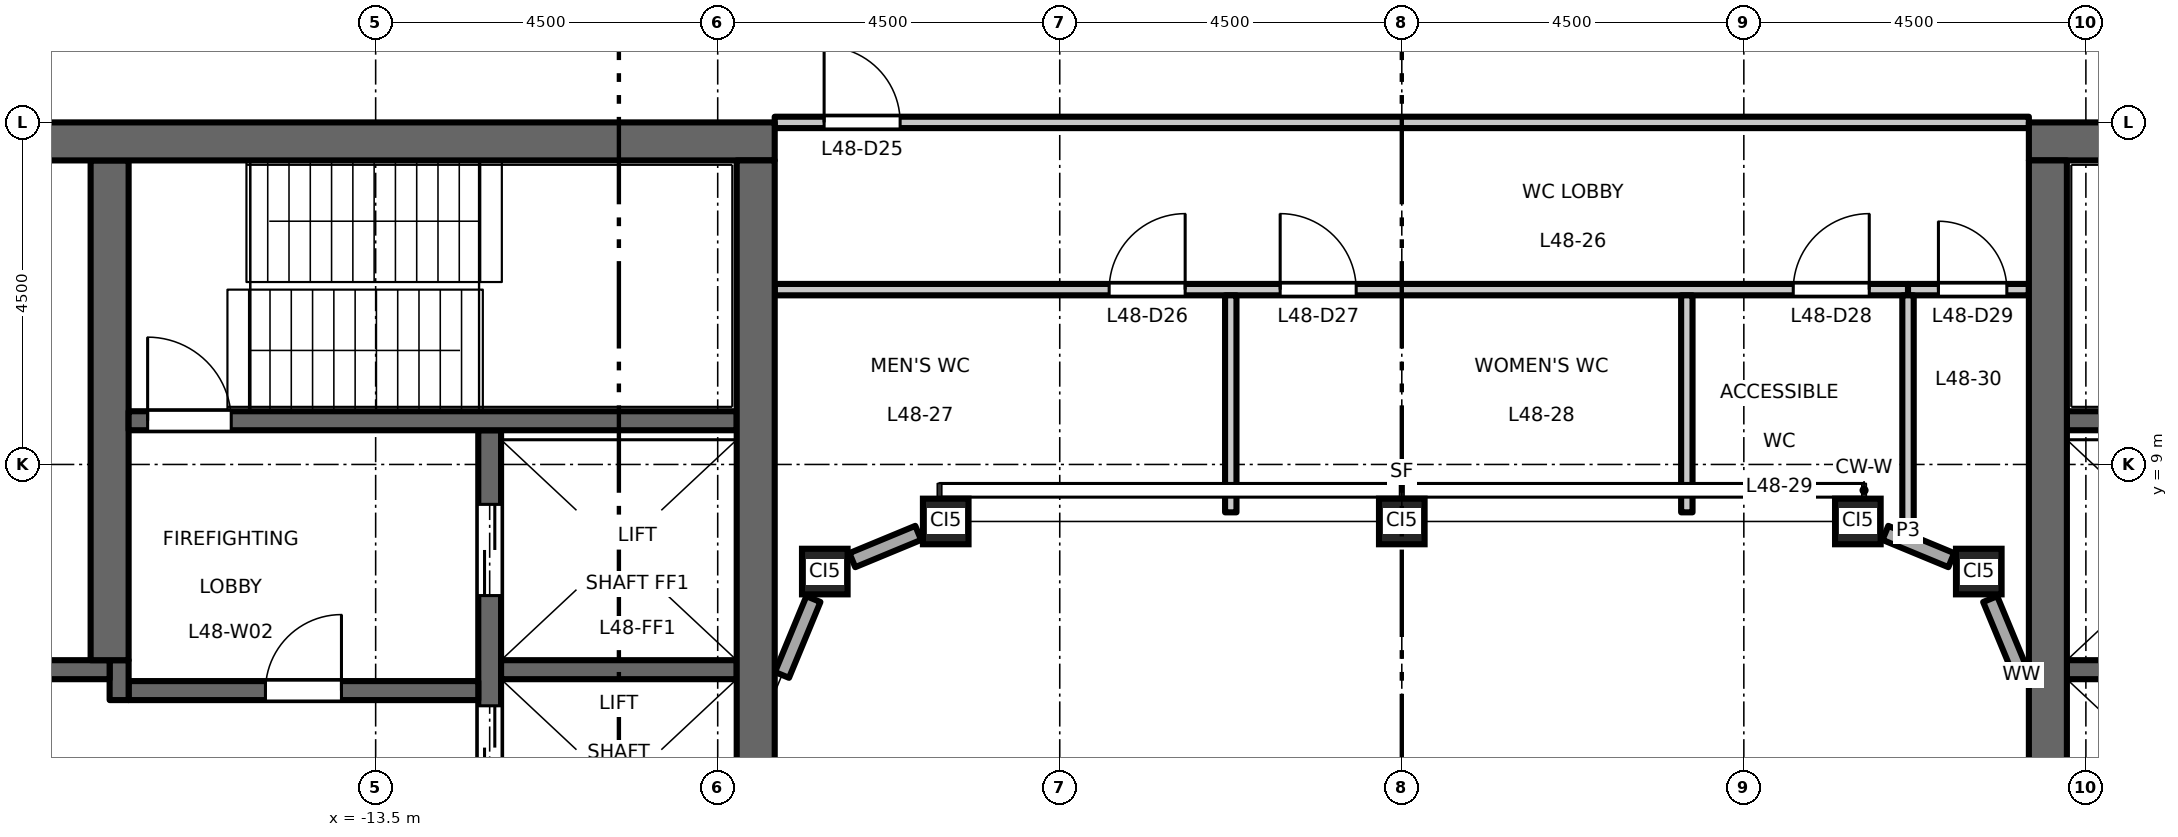
"""IFC4 building model, lengths in metres.
Left out: names, types, materials, properties, quantities, classifications, styles, units other than length and angle.
Written with IfcOpenShell. Run it as: python <this file> out.ifc"""

import sys

from ifc_helpers import new_model, si_unit, direction, frame, frame_2d, origin, origin_2d, place, context, subcontext, project, spatial, rectangle, hollow_rectangle, extrude, element, fill, save


model = new_model("IFC4")
c1 = context("Model", 3, precision=1e-05, world=origin(), true_north=direction((0.0, 1.0)))
c2 = subcontext(c1, "Body", "Model", "MODEL_VIEW")
j1 = project(units=[si_unit("LENGTHUNIT", "METRE"), si_unit("PLANEANGLEUNIT", "RADIAN")], contexts=[c1])
p1 = place(None, origin())
s1 = spatial("IfcSite", under=j1, at=p1, CompositionType="ELEMENT")
p2 = place(p1, origin())
s2 = spatial("IfcBuilding", under=s1, at=p2, CompositionType="ELEMENT")
p3 = place(p2, frame((0.0, 0.0, 224.2)))
s3 = spatial("IfcBuildingStorey", under=s2, at=p3, CompositionType="ELEMENT", Elevation=224.2)
for number, where, z_axis, x_axis in (
    (1, (-7.591, 7.591, 0.0), (0.0, 0.0, 1.0), (1.0, 0.0, 0.0)),
    (2, (-6.0, 8.25, 0.0), (0.0, 0.0, 1.0), (1.0, 0.0, 0.0)),
    (3, (0.0, 8.25, 0.0), (0.0, 0.0, 1.0), (1.0, 0.0, 0.0)),
    (4, (6.0, 8.25, 0.0), (0.0, 0.0, 1.0), (1.0, 0.0, 0.0)),
    (5, (7.591, 7.591, 0.0), (0.0, 0.0, 1.0), (1.0, 0.0, 0.0)),
):
    element("IfcColumn", number, at=place(p3, frame(where, z_axis=z_axis, x_axis=x_axis)), inside=s3, PredefinedType="COLUMN", context=c2, shape_type="SweptSolid", body=[
        extrude(hollow_rectangle(XDim=0.6, YDim=0.6, WallThickness=0.032, at=origin_2d()), origin(), (0.0, 0.0, 1.0), 4.5),
    ])
p4 = place(p3, frame((-12.0, -9.45, 0.0), z_axis=(0.0, 0.0, 1.0), x_axis=(0.0, 1.0, 0.0)))
e6 = element("IfcWall", 6, at=p4, inside=s3, PredefinedType="SHEAR", context=c2, shape_type="SweptSolid", body=[
    extrude(rectangle(XDim=18.9, YDim=0.3, at=frame_2d((9.45, 0.0))), origin(), (0.0, 0.0, 1.0), 4.35),
])
p5 = place(p4, frame((4.725, 0.0, 0.0)))
e7 = element("IfcOpeningElement", 7, at=p5, cuts=e6, PredefinedType="OPENING", context=c2, shape_type="SweptSolid", body=[
    extrude(rectangle(XDim=1.1, YDim=2.1, at=frame_2d((0.55, 1.05))), frame((0.0, 0.16, 0.0), z_axis=(0.0, -1.0, 0.0), x_axis=(1.0, 0.0, 0.0)), (0.0, 0.0, 1.0), 0.32),
])
p6 = place(p4, frame((7.875, 0.0, 0.0)))
e8 = element("IfcOpeningElement", 8, at=p6, cuts=e6, PredefinedType="OPENING", context=c2, shape_type="SweptSolid", body=[
    extrude(rectangle(XDim=1.1, YDim=2.1, at=frame_2d((0.55, 1.05))), frame((0.0, 0.16, 0.0), z_axis=(0.0, -1.0, 0.0), x_axis=(1.0, 0.0, 0.0)), (0.0, 0.0, 1.0), 0.32),
])
p7 = place(p4, frame((11.025, 0.0, 0.0)))
e9 = element("IfcOpeningElement", 9, at=p7, cuts=e6, PredefinedType="OPENING", context=c2, shape_type="SweptSolid", body=[
    extrude(rectangle(XDim=1.1, YDim=2.1, at=frame_2d((0.55, 1.05))), frame((0.0, 0.16, 0.0), z_axis=(0.0, -1.0, 0.0), x_axis=(1.0, 0.0, 0.0)), (0.0, 0.0, 1.0), 0.32),
])
p8 = place(p4, frame((14.175, 0.0, 0.0)))
e10 = element("IfcOpeningElement", 10, at=p8, cuts=e6, PredefinedType="OPENING", context=c2, shape_type="SweptSolid", body=[
    extrude(rectangle(XDim=1.1, YDim=2.1, at=frame_2d((0.55, 1.05))), frame((0.0, 0.16, 0.0), z_axis=(0.0, -1.0, 0.0), x_axis=(1.0, 0.0, 0.0)), (0.0, 0.0, 1.0), 0.32),
])
p9 = place(p4, frame((16.725, 0.0, 0.0)))
e11 = element("IfcOpeningElement", 11, at=p9, cuts=e6, PredefinedType="OPENING", context=c2, shape_type="SweptSolid", body=[
    extrude(rectangle(XDim=1.2, YDim=2.1, at=frame_2d((0.6, 1.05))), frame((0.0, 0.16, 0.0), z_axis=(0.0, -1.0, 0.0), x_axis=(1.0, 0.0, 0.0)), (0.0, 0.0, 1.0), 0.32),
])
p10 = place(p4, frame((0.975, 0.0, 0.0)))
e12 = element("IfcOpeningElement", 12, at=p10, cuts=e6, PredefinedType="OPENING", context=c2, shape_type="SweptSolid", body=[
    extrude(rectangle(XDim=1.2, YDim=2.1, at=frame_2d((0.6, 1.05))), frame((0.0, 0.16, 0.0), z_axis=(0.0, -1.0, 0.0), x_axis=(1.0, 0.0, 0.0)), (0.0, 0.0, 1.0), 0.32),
])
p11 = place(p3, frame((-12.15, 6.025, 0.0), z_axis=(0.0, 0.0, 1.0), x_axis=(-1.0, 0.0, 0.0)))
e13 = element("IfcWall", 13, at=p11, inside=s3, PredefinedType="SHEAR", context=c2, shape_type="SweptSolid", body=[
    extrude(rectangle(XDim=4.6, YDim=0.25, at=frame_2d((2.3, 0.0))), origin(), (0.0, 0.0, 1.0), 4.35),
])
p12 = place(p11, frame((1.8, 0.0, 0.0)))
e14 = element("IfcOpeningElement", 14, at=p12, cuts=e13, PredefinedType="OPENING", context=c2, shape_type="SweptSolid", body=[
    extrude(rectangle(XDim=1.0, YDim=2.1, at=frame_2d((0.5, 1.05))), frame((0.0, 0.135, 0.0), z_axis=(0.0, -1.0, 0.0), x_axis=(1.0, 0.0, 0.0)), (0.0, 0.0, 1.0), 0.27),
])
p13 = place(p3, frame((-16.875, 5.9, 0.0), z_axis=(0.0, 0.0, 1.0), x_axis=(0.0, 1.0, 0.0)))
e15 = element("IfcWall", 15, at=p13, inside=s3, PredefinedType="SHEAR", context=c2, shape_type="SweptSolid", body=[
    extrude(rectangle(XDim=0.525, YDim=0.25, at=frame_2d((0.263, 0.0))), origin(), (0.0, 0.0, 1.0), 4.35),
])
p14 = place(p3, frame((-17.0, 6.3, 0.0), z_axis=(0.0, 0.0, 1.0), x_axis=(-1.0, 0.0, 0.0)))
e16 = element("IfcWall", 16, at=p14, inside=s3, PredefinedType="SHEAR", context=c2, shape_type="SweptSolid", body=[
    extrude(rectangle(XDim=4.25, YDim=0.25, at=frame_2d((2.125, 0.0))), origin(), (0.0, 0.0, 1.0), 4.35),
])
p15 = place(p3, frame((-17.0, 6.425, 0.0), z_axis=(0.0, 0.0, 1.0), x_axis=(0.0, 1.0, 0.0)))
e17 = element("IfcWall", 17, at=p15, inside=s3, PredefinedType="SHEAR", context=c2, shape_type="SweptSolid", body=[
    extrude(rectangle(XDim=6.575, YDim=0.5, at=frame_2d((3.288, 0.0))), origin(), (0.0, 0.0, 1.0), 4.35),
])
p16 = place(p3, frame((-8.75, 6.3, 0.0), z_axis=(0.0, 0.0, 1.0), x_axis=(-1.0, 0.0, 0.0)))
e18 = element("IfcWall", 18, at=p16, inside=s3, PredefinedType="SHEAR", context=c2, shape_type="SweptSolid", body=[
    extrude(rectangle(XDim=3.1, YDim=0.25, at=frame_2d((1.55, 0.0))), origin(), (0.0, 0.0, 1.0), 4.35),
])
p17 = place(p3, frame((-8.75, 9.575, 0.0), z_axis=(0.0, 0.0, 1.0), x_axis=(-1.0, 0.0, 0.0)))
e19 = element("IfcWall", 19, at=p17, inside=s3, PredefinedType="SHEAR", context=c2, shape_type="SweptSolid", body=[
    extrude(rectangle(XDim=8.0, YDim=0.25, at=frame_2d((4.0, 0.0))), origin(), (0.0, 0.0, 1.0), 4.35),
])
p18 = place(p17, frame((6.65, 0.0, 0.0)))
e20 = element("IfcOpeningElement", 20, at=p18, cuts=e19, PredefinedType="OPENING", context=c2, shape_type="SweptSolid", body=[
    extrude(rectangle(XDim=1.1, YDim=2.1, at=frame_2d((0.55, 1.05))), frame((0.0, 0.135, 0.0), z_axis=(0.0, -1.0, 0.0), x_axis=(1.0, 0.0, 0.0)), (0.0, 0.0, 1.0), 0.27),
])
p19 = place(p3, frame((-8.25, 13.25, 0.0), z_axis=(0.0, 0.0, 1.0), x_axis=(-1.0, 0.0, 0.0)))
e21 = element("IfcWall", 21, at=p19, inside=s3, PredefinedType="SHEAR", context=c2, shape_type="SweptSolid", body=[
    extrude(rectangle(XDim=13.5, YDim=0.5, at=frame_2d((6.75, 0.0))), origin(), (0.0, 0.0, 1.0), 4.35),
])
p20 = place(p3, frame((-8.5, -13.0, 0.0), z_axis=(0.0, 0.0, 1.0), x_axis=(0.0, 1.0, 0.0)))
e22 = element("IfcWall", 22, at=p20, inside=s3, PredefinedType="SHEAR", context=c2, shape_type="SweptSolid", body=[
    extrude(rectangle(XDim=26.0, YDim=0.5, at=frame_2d((13.0, 0.0))), origin(), (0.0, 0.0, 1.0), 4.35),
])
p21 = place(p3, frame((8.75, 6.3, 0.0), z_axis=(0.0, 0.0, 1.0), x_axis=(1.0, 0.0, 0.0)))
e23 = element("IfcWall", 23, at=p21, inside=s3, PredefinedType="SHEAR", context=c2, shape_type="SweptSolid", body=[
    extrude(rectangle(XDim=3.1, YDim=0.25, at=frame_2d((1.55, 0.0))), origin(), (0.0, 0.0, 1.0), 4.35),
])
p22 = place(p3, frame((8.75, 9.575, 0.0), z_axis=(0.0, 0.0, 1.0), x_axis=(1.0, 0.0, 0.0)))
e24 = element("IfcWall", 24, at=p22, inside=s3, PredefinedType="SHEAR", context=c2, shape_type="SweptSolid", body=[
    extrude(rectangle(XDim=8.0, YDim=0.25, at=frame_2d((4.0, 0.0))), origin(), (0.0, 0.0, 1.0), 4.35),
])
p23 = place(p22, frame((6.65, 0.0, 0.0)))
e25 = element("IfcOpeningElement", 25, at=p23, cuts=e24, PredefinedType="OPENING", context=c2, shape_type="SweptSolid", body=[
    extrude(rectangle(XDim=1.1, YDim=2.1, at=frame_2d((0.55, 1.05))), frame((0.0, 0.135, 0.0), z_axis=(0.0, -1.0, 0.0), x_axis=(1.0, 0.0, 0.0)), (0.0, 0.0, 1.0), 0.27),
])
p24 = place(p3, frame((8.25, 13.25, 0.0), z_axis=(0.0, 0.0, 1.0), x_axis=(1.0, 0.0, 0.0)))
e26 = element("IfcWall", 26, at=p24, inside=s3, PredefinedType="SHEAR", context=c2, shape_type="SweptSolid", body=[
    extrude(rectangle(XDim=13.5, YDim=0.5, at=frame_2d((6.75, 0.0))), origin(), (0.0, 0.0, 1.0), 4.35),
])
p25 = place(p3, frame((8.5, -13.0, 0.0), z_axis=(0.0, 0.0, 1.0), x_axis=(0.0, 1.0, 0.0)))
e27 = element("IfcWall", 27, at=p25, inside=s3, PredefinedType="SHEAR", context=c2, shape_type="SweptSolid", body=[
    extrude(rectangle(XDim=26.0, YDim=0.5, at=frame_2d((13.0, 0.0))), origin(), (0.0, 0.0, 1.0), 4.35),
])
p26 = place(p3, frame((8.154, 6.231, 0.0), z_axis=(0.0, 0.0, 1.0), x_axis=(-0.382704496366, 0.923870807235, 0.0)))
e28 = element("IfcWall", 28, at=p26, inside=s3, PredefinedType="STANDARD", context=c2, shape_type="SweptSolid", body=[
    extrude(rectangle(XDim=1.08, YDim=0.2, at=frame_2d((0.54, 0.0))), origin(), (0.0, 0.0, 1.0), 3.918),
])
for number, where, z_axis, x_axis in (
    (29, (7.229, 7.741, 0.0), (0.0, 0.0, 1.0), (-0.924, 0.383, 0.0)),
    (30, (-6.362, 8.1, 0.0), (0.0, 0.0, 1.0), (-0.924, -0.383, 0.0)),
):
    element("IfcWall", number, at=place(p3, frame(where, z_axis=z_axis, x_axis=x_axis)), inside=s3, PredefinedType="STANDARD", context=c2, shape_type="SweptSolid", body=[
        extrude(rectangle(XDim=0.938, YDim=0.2, at=frame_2d((0.469, 0.0))), origin(), (0.0, 0.0, 1.0), 3.918),
    ])
p27 = place(p3, frame((-7.741, 7.229, 0.0), z_axis=(0.0, 0.0, 1.0), x_axis=(-0.382704496366, -0.923870807235, 0.0)))
e31 = element("IfcWall", 31, at=p27, inside=s3, PredefinedType="STANDARD", context=c2, shape_type="SweptSolid", body=[
    extrude(rectangle(XDim=1.08, YDim=0.2, at=frame_2d((0.54, 0.0))), origin(), (0.0, 0.0, 1.0), 3.918),
])
p28 = place(p3, frame((-8.25, 11.3, 0.0), z_axis=(0.0, 0.0, 1.0), x_axis=(1.0, 0.0, 0.0)))
e32 = element("IfcWall", 32, at=p28, inside=s3, PredefinedType="PARTITIONING", context=c2, shape_type="SweptSolid", body=[
    extrude(rectangle(XDim=14.91, YDim=0.15, at=frame_2d((7.455, 0.0))), origin(), (0.0, 0.0, 1.0), 4.35),
])
p29 = place(p28, frame((4.4, 0.0, 0.0)))
e33 = element("IfcOpeningElement", 33, at=p29, cuts=e32, PredefinedType="OPENING", context=c2, shape_type="SweptSolid", body=[
    extrude(rectangle(XDim=1.0, YDim=2.1, at=frame_2d((0.5, 1.05))), frame((0.0, 0.085, 0.0), z_axis=(0.0, -1.0, 0.0), x_axis=(1.0, 0.0, 0.0)), (0.0, 0.0, 1.0), 0.17),
])
p30 = place(p28, frame((6.65, 0.0, 0.0)))
e34 = element("IfcOpeningElement", 34, at=p30, cuts=e32, PredefinedType="OPENING", context=c2, shape_type="SweptSolid", body=[
    extrude(rectangle(XDim=1.0, YDim=2.1, at=frame_2d((0.5, 1.05))), frame((0.0, 0.085, 0.0), z_axis=(0.0, -1.0, 0.0), x_axis=(1.0, 0.0, 0.0)), (0.0, 0.0, 1.0), 0.17),
])
p31 = place(p28, frame((13.4, 0.0, 0.0)))
e35 = element("IfcOpeningElement", 35, at=p31, cuts=e32, PredefinedType="OPENING", context=c2, shape_type="SweptSolid", body=[
    extrude(rectangle(XDim=1.0, YDim=2.1, at=frame_2d((0.5, 1.05))), frame((0.0, 0.085, 0.0), z_axis=(0.0, -1.0, 0.0), x_axis=(1.0, 0.0, 0.0)), (0.0, 0.0, 1.0), 0.17),
])
p32 = place(p3, frame((6.66, 11.3, 0.0), z_axis=(0.0, 0.0, 1.0), x_axis=(1.0, 0.0, 0.0)))
e36 = element("IfcWall", 36, at=p32, inside=s3, PredefinedType="PARTITIONING", context=c2, shape_type="SweptSolid", body=[
    extrude(rectangle(XDim=1.59, YDim=0.15, at=frame_2d((0.795, 0.0))), origin(), (0.0, 0.0, 1.0), 4.35),
])
p33 = place(p32, frame((0.4, 0.0, 0.0)))
e37 = element("IfcOpeningElement", 37, at=p33, cuts=e36, PredefinedType="OPENING", context=c2, shape_type="SweptSolid", body=[
    extrude(rectangle(XDim=0.9, YDim=2.1, at=frame_2d((0.45, 1.05))), frame((0.0, 0.085, 0.0), z_axis=(0.0, -1.0, 0.0), x_axis=(1.0, 0.0, 0.0)), (0.0, 0.0, 1.0), 0.17),
])
p34 = place(p3, frame((-8.25, 13.5, 0.0), z_axis=(0.0, 0.0, 1.0), x_axis=(1.0, 0.0, 0.0)))
e38 = element("IfcWall", 38, at=p34, inside=s3, PredefinedType="PARTITIONING", context=c2, shape_type="SweptSolid", body=[
    extrude(rectangle(XDim=16.5, YDim=0.15, at=frame_2d((8.25, 0.0))), origin(), (0.0, 0.0, 1.0), 4.35),
])
p35 = place(p34, frame((0.65, 0.0, 0.0)))
e39 = element("IfcOpeningElement", 39, at=p35, cuts=e38, PredefinedType="OPENING", context=c2, shape_type="SweptSolid", body=[
    extrude(rectangle(XDim=1.0, YDim=2.1, at=frame_2d((0.5, 1.05))), frame((0.0, 0.085, 0.0), z_axis=(0.0, -1.0, 0.0), x_axis=(1.0, 0.0, 0.0)), (0.0, 0.0, 1.0), 0.17),
])
for number, where, z_axis, x_axis in (
    (40, (-2.25, 8.37, 0.0), (0.0, 0.0, 1.0), (0.0, 1.0, 0.0)),
    (41, (3.75, 8.37, 0.0), (0.0, 0.0, 1.0), (0.0, 1.0, 0.0)),
):
    element("IfcWall", number, at=place(p3, frame(where, z_axis=z_axis, x_axis=x_axis)), inside=s3, PredefinedType="PARTITIONING", context=c2, shape_type="SweptSolid", body=[
        extrude(rectangle(XDim=2.855, YDim=0.15, at=frame_2d((1.427, 0.0))), origin(), (0.0, 0.0, 1.0), 4.35),
    ])
p36 = place(p3, frame((6.66, 8.127, 0.0), z_axis=(0.0, 0.0, 1.0), x_axis=(0.0, 1.0, 0.0)))
e42 = element("IfcWall", 42, at=p36, inside=s3, PredefinedType="PARTITIONING", context=c2, shape_type="SweptSolid", body=[
    extrude(rectangle(XDim=3.098, YDim=0.15, at=frame_2d((1.549, 0.0))), origin(), (0.0, 0.0, 1.0), 4.35),
])
p37 = place(p12, origin())
e43 = element("IfcDoor", 43, at=p37, inside=s3, OperationType="SINGLE_SWING_LEFT", PredefinedType="DOOR", context=c2, shape_type="SweptSolid", body=[
    extrude(rectangle(XDim=1.0, YDim=2.1, at=frame_2d((0.5, 1.05))), frame((0.0, 0.025, 0.0), z_axis=(0.0, -1.0, 0.0), x_axis=(1.0, 0.0, 0.0)), (0.0, 0.0, 1.0), 0.05),
])
fill(e14, e43)
p38 = place(p18, origin())
e44 = element("IfcDoor", 44, at=p38, inside=s3, OperationType="SINGLE_SWING_RIGHT", PredefinedType="DOOR", context=c2, shape_type="SweptSolid", body=[
    extrude(rectangle(XDim=1.1, YDim=2.1, at=frame_2d((0.55, 1.05))), frame((0.0, 0.025, 0.0), z_axis=(0.0, -1.0, 0.0), x_axis=(1.0, 0.0, 0.0)), (0.0, 0.0, 1.0), 0.05),
])
fill(e20, e44)
p39 = place(p8, origin())
e45 = element("IfcDoor", 45, at=p39, inside=s3, OperationType="DOUBLE_DOOR_SLIDING", PredefinedType="DOOR", context=c2, shape_type="SweptSolid", body=[
    extrude(rectangle(XDim=1.1, YDim=2.1, at=frame_2d((0.55, 1.05))), frame((0.0, 0.025, 0.0), z_axis=(0.0, -1.0, 0.0), x_axis=(1.0, 0.0, 0.0)), (0.0, 0.0, 1.0), 0.05),
])
fill(e10, e45)
p40 = place(p9, origin())
e46 = element("IfcDoor", 46, at=p40, inside=s3, OperationType="DOUBLE_DOOR_SLIDING", PredefinedType="DOOR", context=c2, shape_type="SweptSolid", body=[
    extrude(rectangle(XDim=1.2, YDim=2.1, at=frame_2d((0.6, 1.05))), frame((0.0, 0.025, 0.0), z_axis=(0.0, -1.0, 0.0), x_axis=(1.0, 0.0, 0.0)), (0.0, 0.0, 1.0), 0.05),
])
fill(e11, e46)
p41 = place(p35, origin())
e47 = element("IfcDoor", 47, at=p41, inside=s3, OperationType="SINGLE_SWING_LEFT", PredefinedType="DOOR", context=c2, shape_type="SweptSolid", body=[
    extrude(rectangle(XDim=1.0, YDim=2.1, at=frame_2d((0.5, 1.05))), frame((0.0, 0.025, 0.0), z_axis=(0.0, -1.0, 0.0), x_axis=(1.0, 0.0, 0.0)), (0.0, 0.0, 1.0), 0.05),
])
fill(e39, e47)
p42 = place(p29, origin())
e48 = element("IfcDoor", 48, at=p42, inside=s3, OperationType="SINGLE_SWING_RIGHT", PredefinedType="DOOR", context=c2, shape_type="SweptSolid", body=[
    extrude(rectangle(XDim=1.0, YDim=2.1, at=frame_2d((0.5, 1.05))), frame((0.0, 0.025, 0.0), z_axis=(0.0, -1.0, 0.0), x_axis=(1.0, 0.0, 0.0)), (0.0, 0.0, 1.0), 0.05),
])
fill(e33, e48)
p43 = place(p30, origin())
e49 = element("IfcDoor", 49, at=p43, inside=s3, OperationType="SINGLE_SWING_LEFT", PredefinedType="DOOR", context=c2, shape_type="SweptSolid", body=[
    extrude(rectangle(XDim=1.0, YDim=2.1, at=frame_2d((0.5, 1.05))), frame((0.0, 0.025, 0.0), z_axis=(0.0, -1.0, 0.0), x_axis=(1.0, 0.0, 0.0)), (0.0, 0.0, 1.0), 0.05),
])
fill(e34, e49)
p44 = place(p31, origin())
e50 = element("IfcDoor", 50, at=p44, inside=s3, OperationType="SINGLE_SWING_RIGHT", PredefinedType="DOOR", context=c2, shape_type="SweptSolid", body=[
    extrude(rectangle(XDim=1.0, YDim=2.1, at=frame_2d((0.5, 1.05))), frame((0.0, 0.025, 0.0), z_axis=(0.0, -1.0, 0.0), x_axis=(1.0, 0.0, 0.0)), (0.0, 0.0, 1.0), 0.05),
])
fill(e35, e50)
p45 = place(p33, origin())
e51 = element("IfcDoor", 51, at=p45, inside=s3, OperationType="SINGLE_SWING_LEFT", PredefinedType="DOOR", context=c2, shape_type="SweptSolid", body=[
    extrude(rectangle(XDim=0.9, YDim=2.1, at=frame_2d((0.45, 1.05))), frame((0.0, 0.025, 0.0), z_axis=(0.0, -1.0, 0.0), x_axis=(1.0, 0.0, 0.0)), (0.0, 0.0, 1.0), 0.05),
])
fill(e37, e51)
save(model, sys.argv[1])
